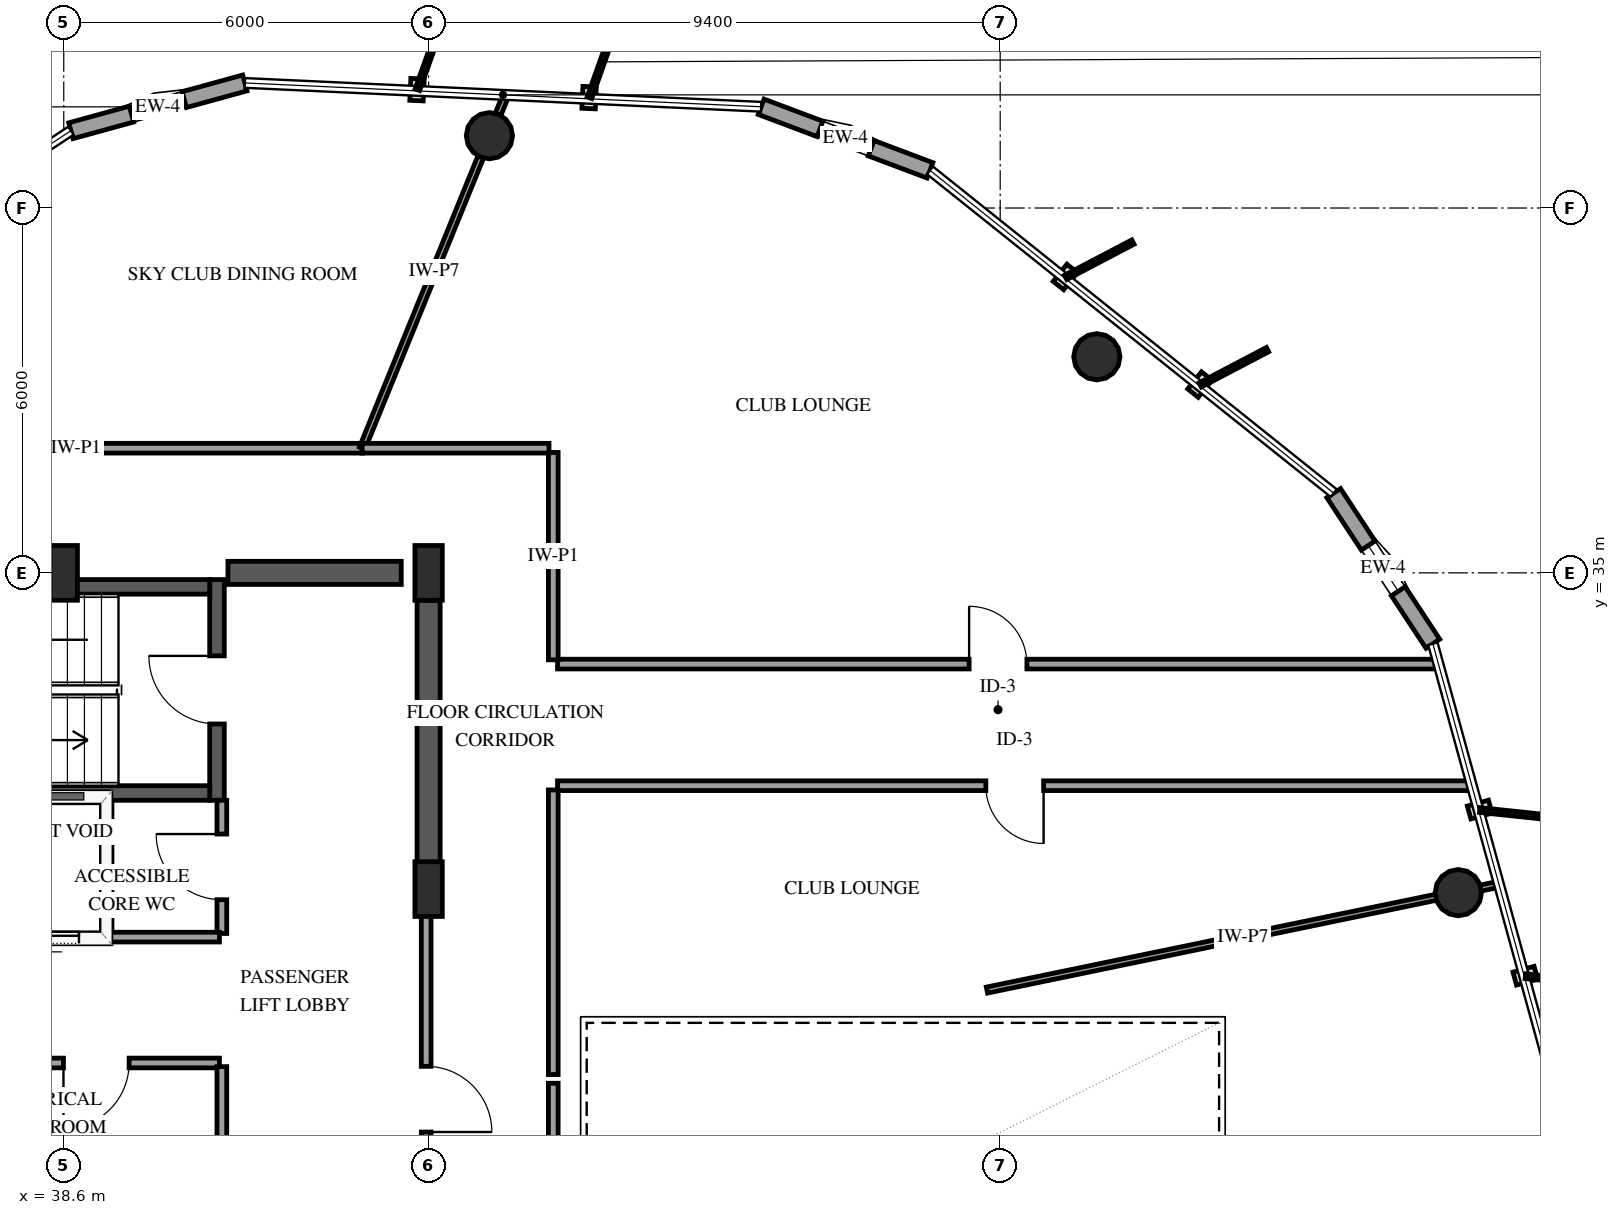
"""IFC4 building model, lengths in metres.
Left out: names, types, materials, properties, quantities, classifications, styles, units other than length and angle.
Written with IfcOpenShell. Run it as: python <this file> out.ifc"""

import sys

from ifc_helpers import new_model, si_unit, direction, frame, frame_2d, origin, origin_2d, place, context, subcontext, project, spatial, rectangle, hollow_circle, extrude, element, fill, save


model = new_model("IFC4")
c1 = context("Model", 3, precision=1e-05, world=origin(), true_north=direction((0.0, 1.0)))
c2 = subcontext(c1, "Body", "Model", "MODEL_VIEW")
j1 = project(units=[si_unit("LENGTHUNIT", "METRE"), si_unit("PLANEANGLEUNIT", "RADIAN")], contexts=[c1])
p1 = place(None, origin())
s1 = spatial("IfcSite", under=j1, at=p1, CompositionType="ELEMENT")
p2 = place(p1, origin())
s2 = spatial("IfcBuilding", under=s1, at=p2, CompositionType="ELEMENT")
p3 = place(p2, frame((0.0, 0.0, 288.55)))
s3 = spatial("IfcBuildingStorey", under=s2, at=p3, CompositionType="ELEMENT", Elevation=288.55)
p4 = place(p3, frame((41.12, 31.26, 0.0), z_axis=(0.0, 0.0, 1.0), x_axis=(0.0, 1.0, 0.0)))
e1 = element("IfcWall", 1, at=p4, inside=s3, PredefinedType="SHEAR", context=c2, shape_type="SweptSolid", body=[
    extrude(rectangle(XDim=3.63, YDim=0.24, at=frame_2d((1.815, 0.0))), origin(), (0.0, 0.0, 1.0), 4.5),
])
p5 = place(p4, frame((1.255, 0.0, 0.0)))
e2 = element("IfcOpeningElement", 2, at=p5, cuts=e1, PredefinedType="OPENING", context=c2, shape_type="SweptSolid", body=[
    extrude(rectangle(XDim=1.12, YDim=2.15, at=frame_2d((0.56, 1.075))), frame((0.0, 0.13, 0.0), z_axis=(0.0, -1.0, 0.0), x_axis=(1.0, 0.0, 0.0)), (0.0, 0.0, 1.0), 0.26),
])
for number, where, z_axis, x_axis in (
    (3, (33.0, 31.38, 0.0), (0.0, 0.0, 1.0), (1.0, 0.0, 0.0)),
    (4, (33.0, 34.77, 0.0), (0.0, 0.0, 1.0), (1.0, 0.0, 0.0)),
):
    element("IfcWall", number, at=place(p3, frame(where, z_axis=z_axis, x_axis=x_axis)), inside=s3, PredefinedType="SHEAR", context=c2, shape_type="SweptSolid", body=[
        extrude(rectangle(XDim=8.0, YDim=0.24, at=frame_2d((4.0, 0.0))), origin(), (0.0, 0.0, 1.0), 4.5),
    ])
p6 = place(p3, frame((41.3, 35.0, 0.0), z_axis=(0.0, 0.0, 1.0), x_axis=(1.0, 0.0, 0.0)))
e5 = element("IfcWall", 5, at=p6, inside=s3, PredefinedType="SHEAR", context=c2, shape_type="SweptSolid", body=[
    extrude(rectangle(XDim=2.85, YDim=0.38, at=frame_2d((1.425, 0.0))), origin(), (0.0, 0.0, 1.0), 4.5),
])
p7 = place(p3, frame((44.6, 29.8, 0.0), z_axis=(0.0, 0.0, 1.0), x_axis=(0.0, 1.0, 0.0)))
e6 = element("IfcWall", 6, at=p7, inside=s3, PredefinedType="SHEAR", context=c2, shape_type="SweptSolid", body=[
    extrude(rectangle(XDim=4.75, YDim=0.38, at=frame_2d((2.375, 0.0))), origin(), (0.0, 0.0, 1.0), 4.5),
])
for number, where, z_axis, x_axis in (
    (7, (38.6, 35.0, 0.0), (0.0, 0.0, 1.0), (1.0, 0.0, 0.0)),
    (8, (44.6, 29.8, 0.0), (0.0, 0.0, 1.0), (1.0, 0.0, 0.0)),
    (9, (44.6, 35.0, 0.0), (0.0, 0.0, 1.0), (1.0, 0.0, 0.0)),
):
    element("IfcColumn", number, at=place(p3, frame(where, z_axis=z_axis, x_axis=x_axis)), inside=s3, PredefinedType="PILASTER", context=c2, shape_type="SweptSolid", body=[
        extrude(rectangle(XDim=0.45, YDim=0.9, at=origin_2d()), origin(), (0.0, 0.0, 1.0), 4.195),
    ])
for number, where, z_axis, x_axis in (
    (10, (61.534, 29.741, 0.0), (0.0, 0.0, 1.0), (1.0, 0.0, 0.0)),
    (11, (55.589, 38.554, 0.0), (0.0, 0.0, 1.0), (1.0, 0.0, 0.0)),
    (12, (45.6, 42.189, 0.0), (0.0, 0.0, 1.0), (1.0, 0.0, 0.0)),
):
    element("IfcColumn", number, at=place(p3, frame(where, z_axis=z_axis, x_axis=x_axis)), inside=s3, PredefinedType="COLUMN", context=c2, shape_type="SweptSolid", body=[
        extrude(hollow_circle(Radius=0.381, WallThickness=0.025, at=origin_2d()), origin(), (0.0, 0.0, 1.0), 4.165),
    ])
p8 = place(p3, frame((41.578, 43.057, 0.0), z_axis=(0.0, 0.0, 1.0), x_axis=(-0.964272165629, -0.264913553056, 0.0)))
e13 = element("IfcWall", 13, at=p8, inside=s3, PredefinedType="SOLIDWALL", context=c2, shape_type="SweptSolid", body=[
    extrude(rectangle(XDim=2.967, YDim=0.27, at=frame_2d((1.483, 0.0))), origin(), (0.0, 0.0, 1.0), 3.574),
])
p9 = place(p8, frame((1.033, 0.0, 0.75)))
e14 = element("IfcOpeningElement", 14, at=p9, cuts=e13, PredefinedType="OPENING", context=c2, shape_type="SweptSolid", body=[
    extrude(rectangle(XDim=0.9, YDim=1.5, at=frame_2d((0.45, 0.75))), frame((0.0, 0.145, 0.0), z_axis=(0.0, -1.0, 0.0), x_axis=(1.0, 0.0, 0.0)), (0.0, 0.0, 1.0), 0.29),
])
p10 = place(p3, frame((61.115, 33.834, 0.0), z_axis=(0.0, 0.0, 1.0), x_axis=(-0.549905162687, 0.835227102081, 0.0)))
e15 = element("IfcWall", 15, at=p10, inside=s3, PredefinedType="SOLIDWALL", context=c2, shape_type="SweptSolid", body=[
    extrude(rectangle(XDim=2.967, YDim=0.27, at=frame_2d((1.483, 0.0))), origin(), (0.0, 0.0, 1.0), 3.574),
])
p11 = place(p10, frame((1.033, 0.0, 0.75)))
e16 = element("IfcOpeningElement", 16, at=p11, cuts=e15, PredefinedType="OPENING", context=c2, shape_type="SweptSolid", body=[
    extrude(rectangle(XDim=0.9, YDim=1.5, at=frame_2d((0.45, 0.75))), frame((0.0, 0.145, 0.0), z_axis=(0.0, -1.0, 0.0), x_axis=(1.0, 0.0, 0.0)), (0.0, 0.0, 1.0), 0.29),
])
p12 = place(p3, frame((52.845, 41.619, 0.0), z_axis=(0.0, 0.0, 1.0), x_axis=(-0.935827708893, 0.352457797853, 0.0)))
e17 = element("IfcWall", 17, at=p12, inside=s3, PredefinedType="SOLIDWALL", context=c2, shape_type="SweptSolid", body=[
    extrude(rectangle(XDim=2.967, YDim=0.27, at=frame_2d((1.483, 0.0))), origin(), (0.0, 0.0, 1.0), 3.574),
])
p13 = place(p12, frame((1.033, 0.0, 0.75)))
e18 = element("IfcOpeningElement", 18, at=p13, cuts=e17, PredefinedType="OPENING", context=c2, shape_type="SweptSolid", body=[
    extrude(rectangle(XDim=0.9, YDim=1.5, at=frame_2d((0.45, 0.75))), frame((0.0, 0.145, 0.0), z_axis=(0.0, -1.0, 0.0), x_axis=(1.0, 0.0, 0.0)), (0.0, 0.0, 1.0), 0.29),
])
p14 = place(p3, frame((37.3, 29.0, 0.0), z_axis=(0.0, 0.0, 1.0), x_axis=(1.0, 0.0, 0.0)))
e19 = element("IfcWall", 19, at=p14, inside=s3, PredefinedType="SOLIDWALL", context=c2, shape_type="SweptSolid", body=[
    extrude(rectangle(XDim=2.0, YDim=0.185, at=frame_2d((1.0, 0.0))), origin(), (0.0, 0.0, 1.0), 4.195),
])
p15 = place(p14, frame((0.45, 0.0, 0.0)))
e20 = element("IfcOpeningElement", 20, at=p15, cuts=e19, PredefinedType="OPENING", context=c2, shape_type="SweptSolid", body=[
    extrude(rectangle(XDim=1.1, YDim=2.15, at=frame_2d((0.55, 1.075))), frame((0.0, 0.103, 0.0), z_axis=(0.0, -1.0, 0.0), x_axis=(1.0, 0.0, 0.0)), (0.0, 0.0, 1.0), 0.205),
])
p16 = place(p3, frame((39.3, 29.11, 0.0), z_axis=(0.0, 0.0, 1.0), x_axis=(0.0, 1.0, 0.0)))
e21 = element("IfcWall", 21, at=p16, inside=s3, PredefinedType="SOLIDWALL", context=c2, shape_type="SweptSolid", body=[
    extrude(rectangle(XDim=2.1, YDim=0.185, at=frame_2d((1.05, 0.0))), origin(), (0.0, 0.0, 1.0), 4.195),
])
p17 = place(p3, frame((61.757, 31.5, 0.0), z_axis=(0.0, 0.0, 1.0), x_axis=(-1.0, 0.0, 0.0)))
e22 = element("IfcWall", 22, at=p17, inside=s3, PredefinedType="PARTITIONING", context=c2, shape_type="SweptSolid", body=[
    extrude(rectangle(XDim=15.037, YDim=0.16, at=frame_2d((7.519, 0.0))), origin(), (0.0, 0.0, 1.0), 2.265),
])
p18 = place(p17, frame((7.043, 0.0, 0.0)))
e23 = element("IfcOpeningElement", 23, at=p18, cuts=e22, PredefinedType="OPENING", context=c2, shape_type="SweptSolid", body=[
    extrude(rectangle(XDim=0.95, YDim=2.15, at=frame_2d((0.475, 1.075))), frame((0.0, 0.09, 0.0), z_axis=(0.0, -1.0, 0.0), x_axis=(1.0, 0.0, 0.0)), (0.0, 0.0, 1.0), 0.18),
])
p19 = place(p3, frame((46.72, 33.5, 0.0), z_axis=(0.0, 0.0, 1.0), x_axis=(1.0, 0.0, 0.0)))
e24 = element("IfcWall", 24, at=p19, inside=s3, PredefinedType="PARTITIONING", context=c2, shape_type="SweptSolid", body=[
    extrude(rectangle(XDim=14.487, YDim=0.16, at=frame_2d((7.244, 0.0))), origin(), (0.0, 0.0, 1.0), 2.265),
])
p20 = place(p19, frame((6.769, 0.0, 0.0)))
e25 = element("IfcOpeningElement", 25, at=p20, cuts=e24, PredefinedType="OPENING", context=c2, shape_type="SweptSolid", body=[
    extrude(rectangle(XDim=0.95, YDim=2.15, at=frame_2d((0.475, 1.075))), frame((0.0, 0.09, 0.0), z_axis=(0.0, -1.0, 0.0), x_axis=(1.0, 0.0, 0.0)), (0.0, 0.0, 1.0), 0.18),
])
p21 = place(p3, frame((31.019, 37.05, 0.0), z_axis=(0.0, 0.0, 1.0), x_axis=(1.0, 0.0, 0.0)))
e26 = element("IfcWall", 26, at=p21, inside=s3, PredefinedType="PARTITIONING", context=c2, shape_type="SweptSolid", body=[
    extrude(rectangle(XDim=12.489, YDim=0.16, at=frame_2d((6.245, 0.0))), origin(), (0.0, 0.0, 1.0), 4.195),
])
p22 = place(p21, frame((5.77, 0.0, 0.0)))
e27 = element("IfcOpeningElement", 27, at=p22, cuts=e26, PredefinedType="OPENING", context=c2, shape_type="SweptSolid", body=[
    extrude(rectangle(XDim=0.95, YDim=2.15, at=frame_2d((0.475, 1.075))), frame((0.0, 0.09, 0.0), z_axis=(0.0, -1.0, 0.0), x_axis=(1.0, 0.0, 0.0)), (0.0, 0.0, 1.0), 0.18),
])
p23 = place(p3, frame((46.65, 26.607, 0.0), z_axis=(0.0, 0.0, 1.0), x_axis=(0.0, -1.0, 0.0)))
e28 = element("IfcWall", 28, at=p23, inside=s3, PredefinedType="PARTITIONING", context=c2, shape_type="SweptSolid", body=[
    extrude(rectangle(XDim=8.037, YDim=0.16, at=frame_2d((4.019, 0.0))), origin(), (0.0, 0.0, 1.0), 4.195),
])
p24 = place(p3, frame((44.56, 29.8, 0.0), z_axis=(0.0, 0.0, 1.0), x_axis=(0.0, -1.0, 0.0)))
e29 = element("IfcWall", 29, at=p24, inside=s3, PredefinedType="PARTITIONING", context=c2, shape_type="SweptSolid", body=[
    extrude(rectangle(XDim=6.91, YDim=0.16, at=frame_2d((3.455, 0.0))), origin(), (0.0, 0.0, 1.0), 3.235),
])
p25 = place(p24, frame((2.915, 0.0, 0.0)))
e30 = element("IfcOpeningElement", 30, at=p25, cuts=e29, PredefinedType="OPENING", context=c2, shape_type="SweptSolid", body=[
    extrude(rectangle(XDim=1.08, YDim=2.15, at=frame_2d((0.54, 1.075))), frame((0.0, 0.09, 0.0), z_axis=(0.0, -1.0, 0.0), x_axis=(1.0, 0.0, 0.0)), (0.0, 0.0, 1.0), 0.18),
])
p26 = place(p3, frame((43.508, 37.05, 0.0), z_axis=(0.0, 0.0, 1.0), x_axis=(0.37694814958, 0.926234361557, 0.0)))
e31 = element("IfcWall", 31, at=p26, inside=s3, PredefinedType="PARTITIONING", context=c2, shape_type="SweptSolid", body=[
    extrude(rectangle(XDim=6.271, YDim=0.1, at=frame_2d((3.136, 0.0))), origin(), (0.0, 0.0, 1.0), 2.485),
])
p27 = place(p3, frame((46.65, 31.43, 0.0), z_axis=(0.0, 0.0, 1.0), x_axis=(0.0, -1.0, 0.0)))
e32 = element("IfcWall", 32, at=p27, inside=s3, PredefinedType="PARTITIONING", context=c2, shape_type="SweptSolid", body=[
    extrude(rectangle(XDim=4.68, YDim=0.16, at=frame_2d((2.34, 0.0))), origin(), (0.0, 0.0, 1.0), 4.195),
])
p28 = place(p3, frame((41.16, 26.94, 0.0), z_axis=(0.0, 0.0, 1.0), x_axis=(-1.0, 0.0, 0.0)))
e33 = element("IfcWall", 33, at=p28, inside=s3, PredefinedType="PARTITIONING", context=c2, shape_type="SweptSolid", body=[
    extrude(rectangle(XDim=4.05, YDim=0.16, at=frame_2d((2.025, 0.0))), origin(), (0.0, 0.0, 1.0), 4.195),
])
p29 = place(p28, frame((1.485, 0.0, 0.0)))
e34 = element("IfcOpeningElement", 34, at=p29, cuts=e33, PredefinedType="OPENING", context=c2, shape_type="SweptSolid", body=[
    extrude(rectangle(XDim=1.08, YDim=2.15, at=frame_2d((0.54, 1.075))), frame((0.0, 0.09, 0.0), z_axis=(0.0, -1.0, 0.0), x_axis=(1.0, 0.0, 0.0)), (0.0, 0.0, 1.0), 0.18),
])
p30 = place(p3, frame((46.65, 36.98, 0.0), z_axis=(0.0, 0.0, 1.0), x_axis=(0.0, -1.0, 0.0)))
e35 = element("IfcWall", 35, at=p30, inside=s3, PredefinedType="PARTITIONING", context=c2, shape_type="SweptSolid", body=[
    extrude(rectangle(XDim=3.41, YDim=0.16, at=frame_2d((1.705, 0.0))), origin(), (0.0, 0.0, 1.0), 4.195),
])
p31 = place(p3, frame((43.508, 37.05, 0.0), z_axis=(0.0, 0.0, 1.0), x_axis=(1.0, 0.0, 0.0)))
e36 = element("IfcWall", 36, at=p31, inside=s3, PredefinedType="PARTITIONING", context=c2, shape_type="SweptSolid", body=[
    extrude(rectangle(XDim=3.072, YDim=0.16, at=frame_2d((1.536, 0.0))), origin(), (0.0, 0.0, 1.0), 4.195),
])
p32 = place(p3, frame((41.2, 24.55, 0.0), z_axis=(0.0, 0.0, 1.0), x_axis=(0.0, 1.0, 0.0)))
e37 = element("IfcWall", 37, at=p32, inside=s3, PredefinedType="PARTITIONING", context=c2, shape_type="SweptSolid", body=[
    extrude(rectangle(XDim=2.33, YDim=0.16, at=frame_2d((1.165, 0.0))), origin(), (0.0, 0.0, 1.0), 4.195),
])
p33 = place(p3, frame((41.2, 29.07, 0.0), z_axis=(0.0, 0.0, 1.0), x_axis=(0.0, 1.0, 0.0)))
e38 = element("IfcWall", 38, at=p33, inside=s3, PredefinedType="PARTITIONING", context=c2, shape_type="SweptSolid", body=[
    extrude(rectangle(XDim=2.19, YDim=0.16, at=frame_2d((1.095, 0.0))), origin(), (0.0, 0.0, 1.0), 4.195),
])
p34 = place(p33, frame((0.555, 0.0, 0.0)))
e39 = element("IfcOpeningElement", 39, at=p34, cuts=e38, PredefinedType="OPENING", context=c2, shape_type="SweptSolid", body=[
    extrude(rectangle(XDim=1.08, YDim=2.15, at=frame_2d((0.54, 1.075))), frame((0.0, 0.09, 0.0), z_axis=(0.0, -1.0, 0.0), x_axis=(1.0, 0.0, 0.0)), (0.0, 0.0, 1.0), 0.18),
])
p35 = place(p3, frame((39.3, 29.01, 0.0), z_axis=(0.0, 0.0, 1.0), x_axis=(1.0, 0.0, 0.0)))
e40 = element("IfcWall", 40, at=p35, inside=s3, PredefinedType="PARTITIONING", context=c2, shape_type="SweptSolid", body=[
    extrude(rectangle(XDim=1.86, YDim=0.16, at=frame_2d((0.93, 0.0))), origin(), (0.0, 0.0, 1.0), 4.195),
])
p36 = place(p3, frame((62.202, 29.879, 0.0), z_axis=(0.0, 0.0, 1.0), x_axis=(-0.97930798833, -0.202375551868, 0.0)))
e41 = element("IfcWall", 41, at=p36, inside=s3, PredefinedType="PARTITIONING", context=c2, shape_type="SweptSolid", body=[
    extrude(rectangle(XDim=8.598, YDim=0.1, at=frame_2d((4.299, 0.0))), origin(), (0.0, 0.0, 1.0), 2.485),
])
p37 = place(p9, origin())
e42 = element("IfcWindow", 42, at=p37, inside=s3, PartitioningType="SINGLE_PANEL", PredefinedType="WINDOW", context=c2, shape_type="SweptSolid", body=[
    extrude(rectangle(XDim=0.9, YDim=1.5, at=frame_2d((0.45, 0.75))), frame((0.0, 0.03, 0.0), z_axis=(0.0, -1.0, 0.0), x_axis=(1.0, 0.0, 0.0)), (0.0, 0.0, 1.0), 0.06),
])
fill(e14, e42)
p38 = place(p11, origin())
e43 = element("IfcWindow", 43, at=p38, inside=s3, PartitioningType="SINGLE_PANEL", PredefinedType="WINDOW", context=c2, shape_type="SweptSolid", body=[
    extrude(rectangle(XDim=0.9, YDim=1.5, at=frame_2d((0.45, 0.75))), frame((0.0, 0.03, 0.0), z_axis=(0.0, -1.0, 0.0), x_axis=(1.0, 0.0, 0.0)), (0.0, 0.0, 1.0), 0.06),
])
fill(e16, e43)
p39 = place(p13, origin())
e44 = element("IfcWindow", 44, at=p39, inside=s3, PartitioningType="SINGLE_PANEL", PredefinedType="WINDOW", context=c2, shape_type="SweptSolid", body=[
    extrude(rectangle(XDim=0.9, YDim=1.5, at=frame_2d((0.45, 0.75))), frame((0.0, 0.03, 0.0), z_axis=(0.0, -1.0, 0.0), x_axis=(1.0, 0.0, 0.0)), (0.0, 0.0, 1.0), 0.06),
])
fill(e18, e44)
p40 = place(p15, origin())
e45 = element("IfcDoor", 45, at=p40, inside=s3, OperationType="SLIDING_TO_LEFT", PredefinedType="DOOR", context=c2, shape_type="SweptSolid", body=[
    extrude(rectangle(XDim=1.1, YDim=2.15, at=frame_2d((0.55, 1.075))), frame((0.0, 0.025, 0.0), z_axis=(0.0, -1.0, 0.0), x_axis=(1.0, 0.0, 0.0)), (0.0, 0.0, 1.0), 0.05),
])
fill(e20, e45)
p41 = place(p5, origin())
e46 = element("IfcDoor", 46, at=p41, inside=s3, OperationType="SINGLE_SWING_RIGHT", PredefinedType="DOOR", context=c2, shape_type="SweptSolid", body=[
    extrude(rectangle(XDim=1.12, YDim=2.15, at=frame_2d((0.56, 1.075))), frame((0.0, 0.025, 0.0), z_axis=(0.0, -1.0, 0.0), x_axis=(1.0, 0.0, 0.0)), (0.0, 0.0, 1.0), 0.05),
])
fill(e2, e46)
p42 = place(p18, origin())
e47 = element("IfcDoor", 47, at=p42, inside=s3, OperationType="SINGLE_SWING_LEFT", PredefinedType="DOOR", context=c2, shape_type="SweptSolid", body=[
    extrude(rectangle(XDim=0.95, YDim=2.15, at=frame_2d((0.475, 1.075))), frame((0.0, 0.025, 0.0), z_axis=(0.0, -1.0, 0.0), x_axis=(1.0, 0.0, 0.0)), (0.0, 0.0, 1.0), 0.05),
])
fill(e23, e47)
p43 = place(p20, origin())
e48 = element("IfcDoor", 48, at=p43, inside=s3, OperationType="SINGLE_SWING_LEFT", PredefinedType="DOOR", context=c2, shape_type="SweptSolid", body=[
    extrude(rectangle(XDim=0.95, YDim=2.15, at=frame_2d((0.475, 1.075))), frame((0.0, 0.025, 0.0), z_axis=(0.0, -1.0, 0.0), x_axis=(1.0, 0.0, 0.0)), (0.0, 0.0, 1.0), 0.05),
])
fill(e25, e48)
p44 = place(p25, origin())
e49 = element("IfcDoor", 49, at=p44, inside=s3, OperationType="SINGLE_SWING_RIGHT", PredefinedType="DOOR", context=c2, shape_type="SweptSolid", body=[
    extrude(rectangle(XDim=1.08, YDim=2.15, at=frame_2d((0.54, 1.075))), frame((0.0, 0.025, 0.0), z_axis=(0.0, -1.0, 0.0), x_axis=(1.0, 0.0, 0.0)), (0.0, 0.0, 1.0), 0.05),
])
fill(e30, e49)
p45 = place(p29, origin())
e50 = element("IfcDoor", 50, at=p45, inside=s3, OperationType="SINGLE_SWING_RIGHT", PredefinedType="DOOR", context=c2, shape_type="SweptSolid", body=[
    extrude(rectangle(XDim=1.08, YDim=2.15, at=frame_2d((0.54, 1.075))), frame((0.0, 0.025, 0.0), z_axis=(0.0, -1.0, 0.0), x_axis=(1.0, 0.0, 0.0)), (0.0, 0.0, 1.0), 0.05),
])
fill(e34, e50)
p46 = place(p34, origin())
e51 = element("IfcDoor", 51, at=p46, inside=s3, OperationType="SINGLE_SWING_RIGHT", PredefinedType="DOOR", context=c2, shape_type="SweptSolid", body=[
    extrude(rectangle(XDim=1.08, YDim=2.15, at=frame_2d((0.54, 1.075))), frame((0.0, 0.025, 0.0), z_axis=(0.0, -1.0, 0.0), x_axis=(1.0, 0.0, 0.0)), (0.0, 0.0, 1.0), 0.05),
])
fill(e39, e51)
save(model, sys.argv[1])
